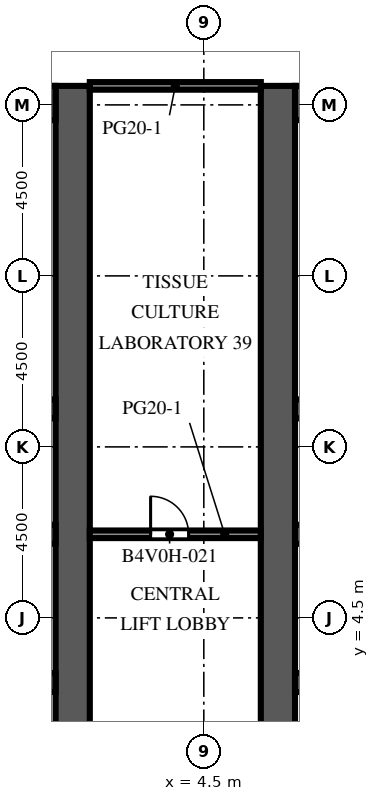
"""IFC4 building model, lengths in metres.
Left out: names, types, materials, properties, quantities, classifications, styles, units other than length and angle.
Written with IfcOpenShell. Run it as: python <this file> out.ifc"""

import sys

from ifc_helpers import new_model, si_unit, direction, frame, frame_2d, origin, place, context, subcontext, project, spatial, rectangle, extrude, element, fill, save


model = new_model("IFC4")
c1 = context("Model", 3, precision=1e-05, world=origin(), true_north=direction((0.0, 1.0)))
c2 = subcontext(c1, "Body", "Model", "MODEL_VIEW")
j1 = project(units=[si_unit("LENGTHUNIT", "METRE"), si_unit("PLANEANGLEUNIT", "RADIAN")], contexts=[c1])
p1 = place(None, origin())
s1 = spatial("IfcSite", under=j1, at=p1, CompositionType="ELEMENT")
p2 = place(p1, origin())
s2 = spatial("IfcBuilding", under=s1, at=p2, CompositionType="ELEMENT")
p3 = place(p2, frame((0.0, 0.0, 116.7)))
s3 = spatial("IfcBuildingStorey", under=s2, at=p3, CompositionType="ELEMENT", Elevation=116.7)
p4 = place(p3, frame((1.05, -9.0, 0.0), z_axis=(0.0, 0.0, 1.0), x_axis=(0.0, 1.0, 0.0)))
e1 = element("IfcWall", 1, at=p4, inside=s3, PredefinedType="SHEAR", context=c2, shape_type="SweptSolid", body=[
    extrude(rectangle(XDim=27.5, YDim=0.9, at=frame_2d((13.75, 0.0))), origin(), (0.0, 0.0, 1.0), 4.1),
])
p5 = place(p4, frame((12.55, 0.0, 0.0)))
e2 = element("IfcOpeningElement", 2, at=p5, cuts=e1, PredefinedType="OPENING", context=c2, shape_type="SweptSolid", body=[
    extrude(rectangle(XDim=2.4, YDim=2.4, at=frame_2d((1.2, 1.2))), frame((0.0, 0.46, 0.0), z_axis=(0.0, -1.0, 0.0), x_axis=(1.0, 0.0, 0.0)), (0.0, 0.0, 1.0), 0.92),
])
p6 = place(p4, frame((3.975, 0.0, 0.0)))
e3 = element("IfcOpeningElement", 3, at=p6, cuts=e1, PredefinedType="OPENING", context=c2, shape_type="SweptSolid", body=[
    extrude(rectangle(XDim=1.2, YDim=2.1, at=frame_2d((0.6, 1.05))), frame((0.0, 0.46, 0.0), z_axis=(0.0, -1.0, 0.0), x_axis=(1.0, 0.0, 0.0)), (0.0, 0.0, 1.0), 0.92),
])
p7 = place(p4, frame((19.485, 0.0, 0.0)))
e4 = element("IfcOpeningElement", 4, at=p7, cuts=e1, PredefinedType="OPENING", context=c2, shape_type="SweptSolid", body=[
    extrude(rectangle(XDim=1.0, YDim=2.1, at=frame_2d((0.5, 1.05))), frame((0.0, 0.46, 0.0), z_axis=(0.0, -1.0, 0.0), x_axis=(1.0, 0.0, 0.0)), (0.0, 0.0, 1.0), 0.92),
])
p8 = place(p4, frame((21.139, 0.0, 0.0)))
e5 = element("IfcOpeningElement", 5, at=p8, cuts=e1, PredefinedType="OPENING", context=c2, shape_type="SweptSolid", body=[
    extrude(rectangle(XDim=1.0, YDim=2.1, at=frame_2d((0.5, 1.05))), frame((0.0, 0.46, 0.0), z_axis=(0.0, -1.0, 0.0), x_axis=(1.0, 0.0, 0.0)), (0.0, 0.0, 1.0), 0.92),
])
p9 = place(p4, frame((23.16, 0.0, 0.0)))
e6 = element("IfcOpeningElement", 6, at=p9, cuts=e1, PredefinedType="OPENING", context=c2, shape_type="SweptSolid", body=[
    extrude(rectangle(XDim=1.0, YDim=2.1, at=frame_2d((0.5, 1.05))), frame((0.0, 0.46, 0.0), z_axis=(0.0, -1.0, 0.0), x_axis=(1.0, 0.0, 0.0)), (0.0, 0.0, 1.0), 0.92),
])
p10 = place(p4, frame((25.181, 0.0, 0.0)))
e7 = element("IfcOpeningElement", 7, at=p10, cuts=e1, PredefinedType="OPENING", context=c2, shape_type="SweptSolid", body=[
    extrude(rectangle(XDim=1.0, YDim=2.1, at=frame_2d((0.5, 1.05))), frame((0.0, 0.46, 0.0), z_axis=(0.0, -1.0, 0.0), x_axis=(1.0, 0.0, 0.0)), (0.0, 0.0, 1.0), 0.92),
])
p11 = place(p3, frame((-9.6, 18.05, 0.0), z_axis=(0.0, 0.0, 1.0), x_axis=(1.0, 0.0, 0.0)))
e8 = element("IfcWall", 8, at=p11, inside=s3, PredefinedType="SHEAR", context=c2, shape_type="SweptSolid", body=[
    extrude(rectangle(XDim=10.2, YDim=0.9, at=frame_2d((5.1, 0.0))), origin(), (0.0, 0.0, 1.0), 4.1),
])
p12 = place(p3, frame((-9.6, 2.8, 0.0), z_axis=(0.0, 0.0, 1.0), x_axis=(1.0, 0.0, 0.0)))
e9 = element("IfcWall", 9, at=p12, inside=s3, PredefinedType="SHEAR", context=c2, shape_type="SweptSolid", body=[
    extrude(rectangle(XDim=10.2, YDim=0.5, at=frame_2d((5.1, 0.0))), origin(), (0.0, 0.0, 1.0), 4.1),
])
p13 = place(p12, frame((0.562, 0.0, 0.0)))
e10 = element("IfcOpeningElement", 10, at=p13, cuts=e9, PredefinedType="OPENING", context=c2, shape_type="SweptSolid", body=[
    extrude(rectangle(XDim=1.1, YDim=2.1, at=frame_2d((0.55, 1.05))), frame((0.0, 0.26, 0.0), z_axis=(0.0, -1.0, 0.0), x_axis=(1.0, 0.0, 0.0)), (0.0, 0.0, 1.0), 0.52),
])
p14 = place(p12, frame((3.238, 0.0, 0.0)))
e11 = element("IfcOpeningElement", 11, at=p14, cuts=e9, PredefinedType="OPENING", context=c2, shape_type="SweptSolid", body=[
    extrude(rectangle(XDim=1.1, YDim=2.1, at=frame_2d((0.55, 1.05))), frame((0.0, 0.26, 0.0), z_axis=(0.0, -1.0, 0.0), x_axis=(1.0, 0.0, 0.0)), (0.0, 0.0, 1.0), 0.52),
])
p15 = place(p12, frame((8.538, 0.0, 0.0)))
e12 = element("IfcOpeningElement", 12, at=p15, cuts=e9, PredefinedType="OPENING", context=c2, shape_type="SweptSolid", body=[
    extrude(rectangle(XDim=1.1, YDim=2.1, at=frame_2d((0.55, 1.05))), frame((0.0, 0.26, 0.0), z_axis=(0.0, -1.0, 0.0), x_axis=(1.0, 0.0, 0.0)), (0.0, 0.0, 1.0), 0.52),
])
p16 = place(p3, frame((-9.6, 6.7, 0.0), z_axis=(0.0, 0.0, 1.0), x_axis=(1.0, 0.0, 0.0)))
e13 = element("IfcWall", 13, at=p16, inside=s3, PredefinedType="SHEAR", context=c2, shape_type="SweptSolid", body=[
    extrude(rectangle(XDim=10.2, YDim=0.5, at=frame_2d((5.1, 0.0))), origin(), (0.0, 0.0, 1.0), 4.1),
])
p17 = place(p16, frame((0.562, 0.0, 0.0)))
e14 = element("IfcOpeningElement", 14, at=p17, cuts=e13, PredefinedType="OPENING", context=c2, shape_type="SweptSolid", body=[
    extrude(rectangle(XDim=1.1, YDim=2.1, at=frame_2d((0.55, 1.05))), frame((0.0, 0.26, 0.0), z_axis=(0.0, -1.0, 0.0), x_axis=(1.0, 0.0, 0.0)), (0.0, 0.0, 1.0), 0.52),
])
p18 = place(p16, frame((3.288, 0.0, 0.0)))
e15 = element("IfcOpeningElement", 15, at=p18, cuts=e13, PredefinedType="OPENING", context=c2, shape_type="SweptSolid", body=[
    extrude(rectangle(XDim=1.0, YDim=2.1, at=frame_2d((0.5, 1.05))), frame((0.0, 0.26, 0.0), z_axis=(0.0, -1.0, 0.0), x_axis=(1.0, 0.0, 0.0)), (0.0, 0.0, 1.0), 0.52),
])
p19 = place(p16, frame((5.913, 0.0, 0.0)))
e16 = element("IfcOpeningElement", 16, at=p19, cuts=e13, PredefinedType="OPENING", context=c2, shape_type="SweptSolid", body=[
    extrude(rectangle(XDim=1.0, YDim=2.1, at=frame_2d((0.5, 1.05))), frame((0.0, 0.26, 0.0), z_axis=(0.0, -1.0, 0.0), x_axis=(1.0, 0.0, 0.0)), (0.0, 0.0, 1.0), 0.52),
])
p20 = place(p16, frame((8.587, 0.0, 0.0)))
e17 = element("IfcOpeningElement", 17, at=p20, cuts=e13, PredefinedType="OPENING", context=c2, shape_type="SweptSolid", body=[
    extrude(rectangle(XDim=1.0, YDim=2.1, at=frame_2d((0.5, 1.05))), frame((0.0, 0.26, 0.0), z_axis=(0.0, -1.0, 0.0), x_axis=(1.0, 0.0, 0.0)), (0.0, 0.0, 1.0), 0.52),
])
p21 = place(p3, frame((-9.6, 10.0, 0.0), z_axis=(0.0, 0.0, 1.0), x_axis=(1.0, 0.0, 0.0)))
e18 = element("IfcWall", 18, at=p21, inside=s3, PredefinedType="SHEAR", context=c2, shape_type="SweptSolid", body=[
    extrude(rectangle(XDim=10.2, YDim=0.5, at=frame_2d((5.1, 0.0))), origin(), (0.0, 0.0, 1.0), 4.1),
])
p22 = place(p3, frame((6.45, -9.0, 0.0), z_axis=(0.0, 0.0, 1.0), x_axis=(0.0, 1.0, 0.0)))
e19 = element("IfcWall", 19, at=p22, inside=s3, PredefinedType="SHEAR", context=c2, shape_type="SweptSolid", body=[
    extrude(rectangle(XDim=27.5, YDim=0.9, at=frame_2d((13.75, 0.0))), origin(), (0.0, 0.0, 1.0), 4.1),
])
p23 = place(p22, frame((12.55, 0.0, 0.0)))
e20 = element("IfcOpeningElement", 20, at=p23, cuts=e19, PredefinedType="OPENING", context=c2, shape_type="SweptSolid", body=[
    extrude(rectangle(XDim=2.4, YDim=2.4, at=frame_2d((1.2, 1.2))), frame((0.0, 0.46, 0.0), z_axis=(0.0, -1.0, 0.0), x_axis=(1.0, 0.0, 0.0)), (0.0, 0.0, 1.0), 0.92),
])
p24 = place(p22, frame((3.975, 0.0, 0.0)))
e21 = element("IfcOpeningElement", 21, at=p24, cuts=e19, PredefinedType="OPENING", context=c2, shape_type="SweptSolid", body=[
    extrude(rectangle(XDim=1.2, YDim=2.1, at=frame_2d((0.6, 1.05))), frame((0.0, 0.46, 0.0), z_axis=(0.0, -1.0, 0.0), x_axis=(1.0, 0.0, 0.0)), (0.0, 0.0, 1.0), 0.92),
])
p25 = place(p22, frame((19.485, 0.0, 0.0)))
e22 = element("IfcOpeningElement", 22, at=p25, cuts=e19, PredefinedType="OPENING", context=c2, shape_type="SweptSolid", body=[
    extrude(rectangle(XDim=1.0, YDim=2.1, at=frame_2d((0.5, 1.05))), frame((0.0, 0.46, 0.0), z_axis=(0.0, -1.0, 0.0), x_axis=(1.0, 0.0, 0.0)), (0.0, 0.0, 1.0), 0.92),
])
p26 = place(p22, frame((21.139, 0.0, 0.0)))
e23 = element("IfcOpeningElement", 23, at=p26, cuts=e19, PredefinedType="OPENING", context=c2, shape_type="SweptSolid", body=[
    extrude(rectangle(XDim=1.0, YDim=2.1, at=frame_2d((0.5, 1.05))), frame((0.0, 0.46, 0.0), z_axis=(0.0, -1.0, 0.0), x_axis=(1.0, 0.0, 0.0)), (0.0, 0.0, 1.0), 0.92),
])
p27 = place(p22, frame((23.16, 0.0, 0.0)))
e24 = element("IfcOpeningElement", 24, at=p27, cuts=e19, PredefinedType="OPENING", context=c2, shape_type="SweptSolid", body=[
    extrude(rectangle(XDim=1.0, YDim=2.1, at=frame_2d((0.5, 1.05))), frame((0.0, 0.46, 0.0), z_axis=(0.0, -1.0, 0.0), x_axis=(1.0, 0.0, 0.0)), (0.0, 0.0, 1.0), 0.92),
])
p28 = place(p22, frame((25.181, 0.0, 0.0)))
e25 = element("IfcOpeningElement", 25, at=p28, cuts=e19, PredefinedType="OPENING", context=c2, shape_type="SweptSolid", body=[
    extrude(rectangle(XDim=1.0, YDim=2.1, at=frame_2d((0.5, 1.05))), frame((0.0, 0.46, 0.0), z_axis=(0.0, -1.0, 0.0), x_axis=(1.0, 0.0, 0.0)), (0.0, 0.0, 1.0), 0.92),
])
p29 = place(p3, frame((6.9, 18.05, 0.0), z_axis=(0.0, 0.0, 1.0), x_axis=(1.0, 0.0, 0.0)))
e26 = element("IfcWall", 26, at=p29, inside=s3, PredefinedType="SHEAR", context=c2, shape_type="SweptSolid", body=[
    extrude(rectangle(XDim=10.2, YDim=0.9, at=frame_2d((5.1, 0.0))), origin(), (0.0, 0.0, 1.0), 4.1),
])
p30 = place(p3, frame((6.9, 2.8, 0.0), z_axis=(0.0, 0.0, 1.0), x_axis=(1.0, 0.0, 0.0)))
e27 = element("IfcWall", 27, at=p30, inside=s3, PredefinedType="SHEAR", context=c2, shape_type="SweptSolid", body=[
    extrude(rectangle(XDim=10.2, YDim=0.5, at=frame_2d((5.1, 0.0))), origin(), (0.0, 0.0, 1.0), 4.1),
])
p31 = place(p30, frame((0.562, 0.0, 0.0)))
e28 = element("IfcOpeningElement", 28, at=p31, cuts=e27, PredefinedType="OPENING", context=c2, shape_type="SweptSolid", body=[
    extrude(rectangle(XDim=1.1, YDim=2.1, at=frame_2d((0.55, 1.05))), frame((0.0, 0.26, 0.0), z_axis=(0.0, -1.0, 0.0), x_axis=(1.0, 0.0, 0.0)), (0.0, 0.0, 1.0), 0.52),
])
p32 = place(p30, frame((3.238, 0.0, 0.0)))
e29 = element("IfcOpeningElement", 29, at=p32, cuts=e27, PredefinedType="OPENING", context=c2, shape_type="SweptSolid", body=[
    extrude(rectangle(XDim=1.1, YDim=2.1, at=frame_2d((0.55, 1.05))), frame((0.0, 0.26, 0.0), z_axis=(0.0, -1.0, 0.0), x_axis=(1.0, 0.0, 0.0)), (0.0, 0.0, 1.0), 0.52),
])
p33 = place(p30, frame((8.538, 0.0, 0.0)))
e30 = element("IfcOpeningElement", 30, at=p33, cuts=e27, PredefinedType="OPENING", context=c2, shape_type="SweptSolid", body=[
    extrude(rectangle(XDim=1.1, YDim=2.1, at=frame_2d((0.55, 1.05))), frame((0.0, 0.26, 0.0), z_axis=(0.0, -1.0, 0.0), x_axis=(1.0, 0.0, 0.0)), (0.0, 0.0, 1.0), 0.52),
])
p34 = place(p3, frame((6.9, 6.7, 0.0), z_axis=(0.0, 0.0, 1.0), x_axis=(1.0, 0.0, 0.0)))
e31 = element("IfcWall", 31, at=p34, inside=s3, PredefinedType="SHEAR", context=c2, shape_type="SweptSolid", body=[
    extrude(rectangle(XDim=10.2, YDim=0.5, at=frame_2d((5.1, 0.0))), origin(), (0.0, 0.0, 1.0), 4.1),
])
p35 = place(p34, frame((0.562, 0.0, 0.0)))
e32 = element("IfcOpeningElement", 32, at=p35, cuts=e31, PredefinedType="OPENING", context=c2, shape_type="SweptSolid", body=[
    extrude(rectangle(XDim=1.1, YDim=2.1, at=frame_2d((0.55, 1.05))), frame((0.0, 0.26, 0.0), z_axis=(0.0, -1.0, 0.0), x_axis=(1.0, 0.0, 0.0)), (0.0, 0.0, 1.0), 0.52),
])
p36 = place(p34, frame((3.288, 0.0, 0.0)))
e33 = element("IfcOpeningElement", 33, at=p36, cuts=e31, PredefinedType="OPENING", context=c2, shape_type="SweptSolid", body=[
    extrude(rectangle(XDim=1.0, YDim=2.1, at=frame_2d((0.5, 1.05))), frame((0.0, 0.26, 0.0), z_axis=(0.0, -1.0, 0.0), x_axis=(1.0, 0.0, 0.0)), (0.0, 0.0, 1.0), 0.52),
])
p37 = place(p34, frame((5.913, 0.0, 0.0)))
e34 = element("IfcOpeningElement", 34, at=p37, cuts=e31, PredefinedType="OPENING", context=c2, shape_type="SweptSolid", body=[
    extrude(rectangle(XDim=1.0, YDim=2.1, at=frame_2d((0.5, 1.05))), frame((0.0, 0.26, 0.0), z_axis=(0.0, -1.0, 0.0), x_axis=(1.0, 0.0, 0.0)), (0.0, 0.0, 1.0), 0.52),
])
p38 = place(p34, frame((8.587, 0.0, 0.0)))
e35 = element("IfcOpeningElement", 35, at=p38, cuts=e31, PredefinedType="OPENING", context=c2, shape_type="SweptSolid", body=[
    extrude(rectangle(XDim=1.0, YDim=2.1, at=frame_2d((0.5, 1.05))), frame((0.0, 0.26, 0.0), z_axis=(0.0, -1.0, 0.0), x_axis=(1.0, 0.0, 0.0)), (0.0, 0.0, 1.0), 0.52),
])
p39 = place(p3, frame((6.9, 10.0, 0.0), z_axis=(0.0, 0.0, 1.0), x_axis=(1.0, 0.0, 0.0)))
e36 = element("IfcWall", 36, at=p39, inside=s3, PredefinedType="SHEAR", context=c2, shape_type="SweptSolid", body=[
    extrude(rectangle(XDim=10.2, YDim=0.5, at=frame_2d((5.1, 0.0))), origin(), (0.0, 0.0, 1.0), 4.1),
])
for number, where, z_axis, x_axis in (
    (37, (-4.25, 11.72, 0.0), (0.0, 0.0, 1.0), (1.0, 0.0, 0.0)),
    (38, (-4.25, 13.558, 0.0), (0.0, 0.0, 1.0), (1.0, 0.0, 0.0)),
    (39, (-4.25, 15.762, 0.0), (0.0, 0.0, 1.0), (1.0, 0.0, 0.0)),
    (40, (6.9, 11.72, 0.0), (0.0, 0.0, 1.0), (1.0, 0.0, 0.0)),
    (41, (6.9, 13.558, 0.0), (0.0, 0.0, 1.0), (1.0, 0.0, 0.0)),
    (42, (6.9, 15.762, 0.0), (0.0, 0.0, 1.0), (1.0, 0.0, 0.0)),
):
    element("IfcWall", number, at=place(p3, frame(where, z_axis=z_axis, x_axis=x_axis)), inside=s3, PredefinedType="PARTITIONING", context=c2, shape_type="SweptSolid", body=[
        extrude(rectangle(XDim=4.85, YDim=0.1, at=frame_2d((2.425, 0.0))), origin(), (0.0, 0.0, 1.0), 3.65),
    ])
p40 = place(p3, frame((1.5, 6.7, 0.0), z_axis=(0.0, 0.0, 1.0), x_axis=(1.0, 0.0, 0.0)))
e43 = element("IfcWall", 43, at=p40, inside=s3, PredefinedType="PARTITIONING", context=c2, shape_type="SweptSolid", body=[
    extrude(rectangle(XDim=4.5, YDim=0.2, at=frame_2d((2.25, 0.0))), origin(), (0.0, 0.0, 1.0), 3.65),
])
p41 = place(p40, frame((1.6, 0.0, 0.0)))
e44 = element("IfcOpeningElement", 44, at=p41, cuts=e43, PredefinedType="OPENING", context=c2, shape_type="SweptSolid", body=[
    extrude(rectangle(XDim=1.0, YDim=2.1, at=frame_2d((0.5, 1.05))), frame((0.0, 0.11, 0.0), z_axis=(0.0, -1.0, 0.0), x_axis=(1.0, 0.0, 0.0)), (0.0, 0.0, 1.0), 0.22),
])
p42 = place(p3, frame((1.5, 18.5, 0.0), z_axis=(0.0, 0.0, 1.0), x_axis=(1.0, 0.0, 0.0)))
e45 = element("IfcWall", 45, at=p42, inside=s3, PredefinedType="PARTITIONING", context=c2, shape_type="SweptSolid", body=[
    extrude(rectangle(XDim=4.5, YDim=0.2, at=frame_2d((2.25, 0.0))), origin(), (0.0, 0.0, 1.0), 3.65),
])
p43 = place(p5, origin())
e46 = element("IfcDoor", 46, at=p43, inside=s3, OperationType="DOUBLE_DOOR_DOUBLE_SWING", PredefinedType="DOOR", context=c2, shape_type="SweptSolid", body=[
    extrude(rectangle(XDim=2.4, YDim=2.4, at=frame_2d((1.2, 1.2))), frame((0.0, 0.025, 0.0), z_axis=(0.0, -1.0, 0.0), x_axis=(1.0, 0.0, 0.0)), (0.0, 0.0, 1.0), 0.05),
])
fill(e2, e46)
p44 = place(p23, origin())
e47 = element("IfcDoor", 47, at=p44, inside=s3, OperationType="DOUBLE_DOOR_DOUBLE_SWING", PredefinedType="DOOR", context=c2, shape_type="SweptSolid", body=[
    extrude(rectangle(XDim=2.4, YDim=2.4, at=frame_2d((1.2, 1.2))), frame((0.0, 0.025, 0.0), z_axis=(0.0, -1.0, 0.0), x_axis=(1.0, 0.0, 0.0)), (0.0, 0.0, 1.0), 0.05),
])
fill(e20, e47)
p45 = place(p7, origin())
e48 = element("IfcDoor", 48, at=p45, inside=s3, OperationType="SINGLE_SWING_LEFT", PredefinedType="DOOR", context=c2, shape_type="SweptSolid", body=[
    extrude(rectangle(XDim=1.0, YDim=2.1, at=frame_2d((0.5, 1.05))), frame((0.0, 0.425, 0.0), z_axis=(0.0, -1.0, 0.0), x_axis=(1.0, 0.0, 0.0)), (0.0, 0.0, 1.0), 0.05),
])
fill(e4, e48)
p46 = place(p8, origin())
e49 = element("IfcDoor", 49, at=p46, inside=s3, OperationType="SINGLE_SWING_RIGHT", PredefinedType="DOOR", context=c2, shape_type="SweptSolid", body=[
    extrude(rectangle(XDim=1.0, YDim=2.1, at=frame_2d((0.5, 1.05))), frame((0.0, 0.425, 0.0), z_axis=(0.0, -1.0, 0.0), x_axis=(1.0, 0.0, 0.0)), (0.0, 0.0, 1.0), 0.05),
])
fill(e5, e49)
p47 = place(p9, origin())
e50 = element("IfcDoor", 50, at=p47, inside=s3, OperationType="SINGLE_SWING_LEFT", PredefinedType="DOOR", context=c2, shape_type="SweptSolid", body=[
    extrude(rectangle(XDim=1.0, YDim=2.1, at=frame_2d((0.5, 1.05))), frame((0.0, 0.425, 0.0), z_axis=(0.0, -1.0, 0.0), x_axis=(1.0, 0.0, 0.0)), (0.0, 0.0, 1.0), 0.05),
])
fill(e6, e50)
p48 = place(p10, origin())
e51 = element("IfcDoor", 51, at=p48, inside=s3, OperationType="SINGLE_SWING_RIGHT", PredefinedType="DOOR", context=c2, shape_type="SweptSolid", body=[
    extrude(rectangle(XDim=1.0, YDim=2.1, at=frame_2d((0.5, 1.05))), frame((0.0, 0.425, 0.0), z_axis=(0.0, -1.0, 0.0), x_axis=(1.0, 0.0, 0.0)), (0.0, 0.0, 1.0), 0.05),
])
fill(e7, e51)
p49 = place(p25, origin())
e52 = element("IfcDoor", 52, at=p49, inside=s3, OperationType="SINGLE_SWING_RIGHT", PredefinedType="DOOR", context=c2, shape_type="SweptSolid", body=[
    extrude(rectangle(XDim=1.0, YDim=2.1, at=frame_2d((0.5, 1.05))), frame((0.0, -0.375, 0.0), z_axis=(0.0, -1.0, 0.0), x_axis=(1.0, 0.0, 0.0)), (0.0, 0.0, 1.0), 0.05),
])
fill(e22, e52)
p50 = place(p26, origin())
e53 = element("IfcDoor", 53, at=p50, inside=s3, OperationType="SINGLE_SWING_LEFT", PredefinedType="DOOR", context=c2, shape_type="SweptSolid", body=[
    extrude(rectangle(XDim=1.0, YDim=2.1, at=frame_2d((0.5, 1.05))), frame((0.0, -0.375, 0.0), z_axis=(0.0, -1.0, 0.0), x_axis=(1.0, 0.0, 0.0)), (0.0, 0.0, 1.0), 0.05),
])
fill(e23, e53)
p51 = place(p27, origin())
e54 = element("IfcDoor", 54, at=p51, inside=s3, OperationType="SINGLE_SWING_RIGHT", PredefinedType="DOOR", context=c2, shape_type="SweptSolid", body=[
    extrude(rectangle(XDim=1.0, YDim=2.1, at=frame_2d((0.5, 1.05))), frame((0.0, -0.375, 0.0), z_axis=(0.0, -1.0, 0.0), x_axis=(1.0, 0.0, 0.0)), (0.0, 0.0, 1.0), 0.05),
])
fill(e24, e54)
p52 = place(p28, origin())
e55 = element("IfcDoor", 55, at=p52, inside=s3, OperationType="SINGLE_SWING_LEFT", PredefinedType="DOOR", context=c2, shape_type="SweptSolid", body=[
    extrude(rectangle(XDim=1.0, YDim=2.1, at=frame_2d((0.5, 1.05))), frame((0.0, -0.375, 0.0), z_axis=(0.0, -1.0, 0.0), x_axis=(1.0, 0.0, 0.0)), (0.0, 0.0, 1.0), 0.05),
])
fill(e25, e55)
p53 = place(p41, origin())
e56 = element("IfcDoor", 56, at=p53, inside=s3, OperationType="SINGLE_SWING_LEFT", PredefinedType="DOOR", context=c2, shape_type="SweptSolid", body=[
    extrude(rectangle(XDim=1.0, YDim=2.1, at=frame_2d((0.5, 1.05))), frame((0.0, 0.025, 0.0), z_axis=(0.0, -1.0, 0.0), x_axis=(1.0, 0.0, 0.0)), (0.0, 0.0, 1.0), 0.05),
])
fill(e44, e56)
save(model, sys.argv[1])
